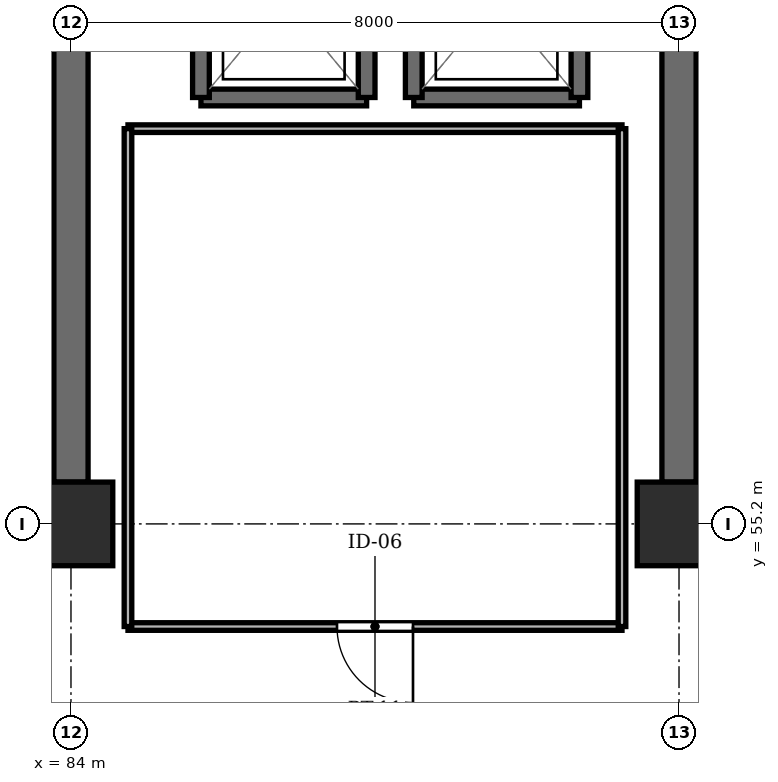
"""IFC4 building model, lengths in metres.
Left out: names, types, materials, properties, quantities, classifications, styles, units other than length and angle.
Written with IfcOpenShell. Run it as: python <this file> out.ifc"""

import sys

from ifc_helpers import new_model, si_unit, direction, frame, frame_2d, origin, origin_2d, place, context, subcontext, project, spatial, rectangle, extrude, element, fill, save


model = new_model("IFC4")
c1 = context("Model", 3, precision=1e-05, world=origin(), true_north=direction((0.0, 1.0)))
c2 = subcontext(c1, "Body", "Model", "MODEL_VIEW")
j1 = project(units=[si_unit("LENGTHUNIT", "METRE"), si_unit("PLANEANGLEUNIT", "RADIAN")], contexts=[c1])
p1 = place(None, origin())
s1 = spatial("IfcSite", under=j1, at=p1, CompositionType="ELEMENT")
p2 = place(p1, origin())
s2 = spatial("IfcBuilding", under=s1, at=p2, CompositionType="ELEMENT")
p3 = place(p2, frame((0.0, 0.0, 34.05)))
s3 = spatial("IfcBuildingStorey", under=s2, at=p3, CompositionType="ELEMENT", Elevation=34.05)
for number, where, z_axis, x_axis in (
    (1, (84.0, 55.2, -0.25), (0.0, 0.0, 1.0), (1.0, 0.0, 0.0)),
    (2, (92.0, 55.2, -0.25), (0.0, 0.0, 1.0), (1.0, 0.0, 0.0)),
):
    element("IfcColumn", number, at=place(p3, frame(where, z_axis=z_axis, x_axis=x_axis)), inside=s3, PredefinedType="COLUMN", context=c2, shape_type="SweptSolid", body=[
        extrude(rectangle(XDim=1.1, YDim=1.1, at=origin_2d()), origin(), (0.0, 0.0, 1.0), 3.25),
    ])
for number, where, z_axis, x_axis in (
    (3, (84.0, 55.75, 0.0), (0.0, 0.0, 1.0), (0.0, 1.0, 0.0)),
    (4, (92.0, 55.75, 0.0), (0.0, 0.0, 1.0), (0.0, 1.0, 0.0)),
):
    element("IfcWall", number, at=place(p3, frame(where, z_axis=z_axis, x_axis=x_axis)), inside=s3, PredefinedType="SHEAR", context=c2, shape_type="SweptSolid", body=[
        extrude(rectangle(XDim=6.2, YDim=0.45, at=frame_2d((3.1, 0.0))), origin(), (0.0, 0.0, 1.0), 3.0),
    ])
p4 = place(p3, frame((85.71, 60.81, 0.0), z_axis=(0.0, 0.0, 1.0), x_axis=(1.0, 0.0, 0.0)))
e5 = element("IfcWall", 5, at=p4, inside=s3, PredefinedType="SHEAR", context=c2, shape_type="SweptSolid", body=[
    extrude(rectangle(XDim=2.18, YDim=0.22, at=frame_2d((1.09, 0.0))), origin(), (0.0, 0.0, 1.0), 3.0),
])
for number, where, z_axis, x_axis in (
    (6, (85.71, 63.39, 0.0), (0.0, 0.0, 1.0), (0.0, -1.0, 0.0)),
    (7, (87.89, 60.81, 0.0), (0.0, 0.0, 1.0), (0.0, 1.0, 0.0)),
):
    element("IfcWall", number, at=place(p3, frame(where, z_axis=z_axis, x_axis=x_axis)), inside=s3, PredefinedType="SHEAR", context=c2, shape_type="SweptSolid", body=[
        extrude(rectangle(XDim=2.58, YDim=0.22, at=frame_2d((1.29, 0.0))), origin(), (0.0, 0.0, 1.0), 3.0),
    ])
p5 = place(p3, frame((88.51, 60.81, 0.0), z_axis=(0.0, 0.0, 1.0), x_axis=(1.0, 0.0, 0.0)))
e8 = element("IfcWall", 8, at=p5, inside=s3, PredefinedType="SHEAR", context=c2, shape_type="SweptSolid", body=[
    extrude(rectangle(XDim=2.18, YDim=0.22, at=frame_2d((1.09, 0.0))), origin(), (0.0, 0.0, 1.0), 3.0),
])
for number, where, z_axis, x_axis in (
    (9, (88.51, 63.39, 0.0), (0.0, 0.0, 1.0), (0.0, -1.0, 0.0)),
    (10, (90.69, 60.81, 0.0), (0.0, 0.0, 1.0), (0.0, 1.0, 0.0)),
):
    element("IfcWall", number, at=place(p3, frame(where, z_axis=z_axis, x_axis=x_axis)), inside=s3, PredefinedType="SHEAR", context=c2, shape_type="SweptSolid", body=[
        extrude(rectangle(XDim=2.58, YDim=0.22, at=frame_2d((1.29, 0.0))), origin(), (0.0, 0.0, 1.0), 3.0),
    ])
p6 = place(p3, frame((84.75, 53.85, 0.0), z_axis=(0.0, 0.0, 1.0), x_axis=(1.0, 0.0, 0.0)))
e11 = element("IfcWall", 11, at=p6, inside=s3, PredefinedType="PARTITIONING", context=c2, shape_type="SweptSolid", body=[
    extrude(rectangle(XDim=6.5, YDim=0.1, at=frame_2d((3.25, 0.0))), origin(), (0.0, 0.0, 1.0), 2.53),
])
p7 = place(p6, frame((2.75, 0.0, 0.0)))
e12 = element("IfcOpeningElement", 12, at=p7, cuts=e11, PredefinedType="OPENING", context=c2, shape_type="SweptSolid", body=[
    extrude(rectangle(XDim=1.0, YDim=2.15, at=frame_2d((0.5, 1.075))), frame((0.0, 0.062, 0.0), z_axis=(0.0, -1.0, 0.0), x_axis=(1.0, 0.0, 0.0)), (0.0, 0.0, 1.0), 0.124),
])
p8 = place(p3, frame((84.75, 60.4, 0.0), z_axis=(0.0, 0.0, 1.0), x_axis=(1.0, 0.0, 0.0)))
e13 = element("IfcWall", 13, at=p8, inside=s3, PredefinedType="PARTITIONING", context=c2, shape_type="SweptSolid", body=[
    extrude(rectangle(XDim=6.5, YDim=0.1, at=frame_2d((3.25, 0.0))), origin(), (0.0, 0.0, 1.0), 2.53),
])
for number, where, z_axis, x_axis in (
    (14, (84.75, 53.85, 0.0), (0.0, 0.0, 1.0), (0.0, 1.0, 0.0)),
    (15, (91.25, 53.85, 0.0), (0.0, 0.0, 1.0), (0.0, 1.0, 0.0)),
):
    element("IfcWall", number, at=place(p3, frame(where, z_axis=z_axis, x_axis=x_axis)), inside=s3, PredefinedType="PARTITIONING", context=c2, shape_type="SweptSolid", body=[
        extrude(rectangle(XDim=6.55, YDim=0.1, at=frame_2d((3.275, 0.0))), origin(), (0.0, 0.0, 1.0), 2.53),
    ])
p9 = place(p7, frame((1.0, 0.0, 0.0), z_axis=(0.0, 0.0, 1.0), x_axis=(-1.0, 0.0, 0.0)))
e16 = element("IfcDoor", 16, at=p9, inside=s3, OperationType="SINGLE_SWING_RIGHT", PredefinedType="DOOR", context=c2, shape_type="SweptSolid", body=[
    extrude(rectangle(XDim=1.0, YDim=2.15, at=frame_2d((0.5, 1.075))), frame((0.0, 0.025, 0.0), z_axis=(0.0, -1.0, 0.0), x_axis=(1.0, 0.0, 0.0)), (0.0, 0.0, 1.0), 0.05),
])
fill(e12, e16)
save(model, sys.argv[1])
